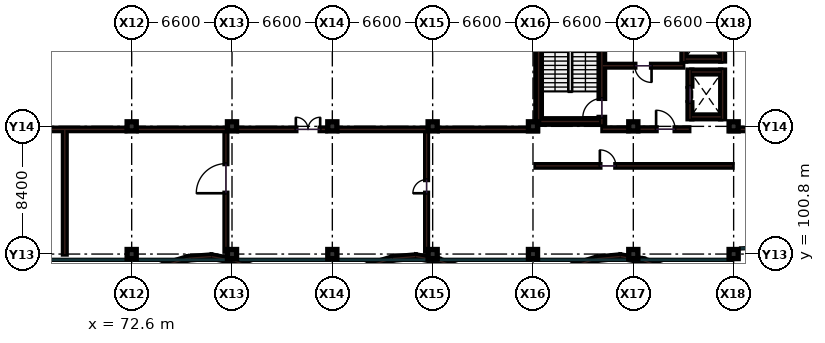
"""IFC4 building model, lengths in metres.
Left out: names, types, materials, properties, quantities, classifications, styles, units other than length and angle.
Written with IfcOpenShell. Run it as: python <this file> out.ifc"""

import sys

from ifc_helpers import new_model, si_unit, direction, frame, frame_2d, origin, origin_2d, place, context, subcontext, project, spatial, rectangle, extrude, element, fill, save


model = new_model("IFC4")
c1 = context("Model", 3, precision=1e-05, world=origin(), true_north=direction((0.0, 1.0)))
c2 = subcontext(c1, "Body", "Model", "MODEL_VIEW")
j1 = project(units=[si_unit("LENGTHUNIT", "METRE"), si_unit("PLANEANGLEUNIT", "RADIAN")], contexts=[c1])
p1 = place(None, origin())
s1 = spatial("IfcSite", under=j1, at=p1, CompositionType="ELEMENT")
p2 = place(p1, origin())
s2 = spatial("IfcBuilding", under=s1, at=p2, CompositionType="ELEMENT")
p3 = place(p2, frame((0.0, 0.0, 14.4)))
s3 = spatial("IfcBuildingStorey", under=s2, at=p3, CompositionType="ELEMENT", Elevation=14.4)
for number, where, z_axis, x_axis in (
    (1, (72.6, 100.8, 0.0), (0.0, 0.0, 1.0), (1.0, 0.0, 0.0)),
    (2, (72.6, 109.2, 0.0), (0.0, 0.0, 1.0), (1.0, 0.0, 0.0)),
    (3, (79.2, 100.8, 0.0), (0.0, 0.0, 1.0), (1.0, 0.0, 0.0)),
    (4, (79.2, 109.2, 0.0), (0.0, 0.0, 1.0), (1.0, 0.0, 0.0)),
    (5, (85.8, 100.8, 0.0), (0.0, 0.0, 1.0), (1.0, 0.0, 0.0)),
    (6, (85.8, 109.2, 0.0), (0.0, 0.0, 1.0), (1.0, 0.0, 0.0)),
    (7, (92.4, 100.8, 0.0), (0.0, 0.0, 1.0), (1.0, 0.0, 0.0)),
    (8, (92.4, 109.2, 0.0), (0.0, 0.0, 1.0), (1.0, 0.0, 0.0)),
    (9, (99.0, 100.8, 0.0), (0.0, 0.0, 1.0), (1.0, 0.0, 0.0)),
    (10, (99.0, 109.2, 0.0), (0.0, 0.0, 1.0), (1.0, 0.0, 0.0)),
    (11, (105.6, 100.8, 0.0), (0.0, 0.0, 1.0), (1.0, 0.0, 0.0)),
    (12, (105.6, 109.2, 0.0), (0.0, 0.0, 1.0), (1.0, 0.0, 0.0)),
    (13, (112.2, 100.8, 0.0), (0.0, 0.0, 1.0), (1.0, 0.0, 0.0)),
    (14, (112.2, 109.2, 0.0), (0.0, 0.0, 1.0), (1.0, 0.0, 0.0)),
):
    element("IfcColumn", number, at=place(p3, frame(where, z_axis=z_axis, x_axis=x_axis)), inside=s3, PredefinedType="COLUMN", context=c2, shape_type="SweptSolid", body=[
        extrude(rectangle(XDim=0.6, YDim=0.6, at=origin_2d()), origin(), (0.0, 0.0, 1.0), 4.2),
    ])
for number, where, z_axis, x_axis in (
    (15, (66.45, 109.0, 0.0), (0.0, 0.0, 1.0), (1.0, 0.0, 0.0)),
    (16, (73.05, 109.0, 0.0), (0.0, 0.0, 1.0), (1.0, 0.0, 0.0)),
):
    element("IfcWall", number, at=place(p3, frame(where, z_axis=z_axis, x_axis=x_axis)), inside=s3, PredefinedType="PARTITIONING", context=c2, shape_type="SweptSolid", body=[
        extrude(rectangle(XDim=5.7, YDim=0.16, at=frame_2d((2.85, 0.0))), origin(), (0.0, 0.0, 1.0), 3.175),
    ])
p4 = place(p3, frame((79.65, 109.0, 0.0), z_axis=(0.0, 0.0, 1.0), x_axis=(1.0, 0.0, 0.0)))
e17 = element("IfcWall", 17, at=p4, inside=s3, PredefinedType="PARTITIONING", context=c2, shape_type="SweptSolid", body=[
    extrude(rectangle(XDim=5.7, YDim=0.16, at=frame_2d((2.85, 0.0))), origin(), (0.0, 0.0, 1.0), 3.175),
])
p5 = place(p4, frame((3.75, 0.0, 0.0)))
e18 = element("IfcOpeningElement", 18, at=p5, cuts=e17, PredefinedType="OPENING", context=c2, shape_type="SweptSolid", body=[
    extrude(rectangle(XDim=1.6, YDim=2.2, at=frame_2d((0.8, 1.1))), frame((0.0, 0.09, 0.0), z_axis=(0.0, -1.0, 0.0), x_axis=(1.0, 0.0, 0.0)), (0.0, 0.0, 1.0), 0.18),
])
p6 = place(p3, frame((86.25, 109.0, 0.0), z_axis=(0.0, 0.0, 1.0), x_axis=(1.0, 0.0, 0.0)))
e19 = element("IfcWall", 19, at=p6, inside=s3, PredefinedType="PARTITIONING", context=c2, shape_type="SweptSolid", body=[
    extrude(rectangle(XDim=5.7, YDim=0.16, at=frame_2d((2.85, 0.0))), origin(), (0.0, 0.0, 1.0), 3.175),
])
p7 = place(p3, frame((92.85, 109.0, 0.0), z_axis=(0.0, 0.0, 1.0), x_axis=(1.0, 0.0, 0.0)))
e20 = element("IfcWall", 20, at=p7, inside=s3, PredefinedType="PARTITIONING", context=c2, shape_type="SweptSolid", body=[
    extrude(rectangle(XDim=6.45, YDim=0.16, at=frame_2d((3.225, 0.0))), origin(), (0.0, 0.0, 1.0), 3.175),
])
p8 = place(p3, frame((112.0, 109.0, 0.0), z_axis=(0.0, 0.0, 1.0), x_axis=(1.0, 0.0, 0.0)))
e21 = element("IfcWall", 21, at=p8, inside=s3, PredefinedType="PARTITIONING", context=c2, shape_type="SweptSolid", body=[
    extrude(rectangle(XDim=6.35, YDim=0.16, at=frame_2d((3.175, 0.0))), origin(), (0.0, 0.0, 1.0), 3.175),
])
p9 = place(p8, frame((4.55, 0.0, 0.0)))
e22 = element("IfcOpeningElement", 22, at=p9, cuts=e21, PredefinedType="OPENING", context=c2, shape_type="SweptSolid", body=[
    extrude(rectangle(XDim=1.45, YDim=2.25, at=frame_2d((0.725, 1.125))), frame((0.0, 0.09, 0.0), z_axis=(0.0, -1.0, 0.0), x_axis=(1.0, 0.0, 0.0)), (0.0, 0.0, 1.0), 0.18),
])
p10 = place(p3, frame((68.2, 100.8, 0.0), z_axis=(0.0, 0.0, 1.0), x_axis=(0.0, 1.0, 0.0)))
e23 = element("IfcWall", 23, at=p10, inside=s3, PredefinedType="SOLIDWALL", context=c2, shape_type="SweptSolid", body=[
    extrude(rectangle(XDim=8.2, YDim=0.18, at=frame_2d((4.1, 0.0))), origin(), (0.0, 0.0, 1.0), 3.19),
])
p11 = place(p3, frame((78.8, 101.0, 0.0), z_axis=(0.0, 0.0, 1.0), x_axis=(0.0, 1.0, 0.0)))
e24 = element("IfcWall", 24, at=p11, inside=s3, PredefinedType="PARTITIONING", context=c2, shape_type="SweptSolid", body=[
    extrude(rectangle(XDim=8.0, YDim=0.12, at=frame_2d((4.0, 0.0))), origin(), (0.0, 0.0, 1.0), 3.19),
])
p12 = place(p11, frame((3.8, 0.0, 0.0)))
e25 = element("IfcOpeningElement", 25, at=p12, cuts=e24, PredefinedType="OPENING", context=c2, shape_type="SweptSolid", body=[
    extrude(rectangle(XDim=1.95, YDim=2.35, at=frame_2d((0.975, 1.175))), frame((0.0, 0.07, 0.0), z_axis=(0.0, -1.0, 0.0), x_axis=(1.0, 0.0, 0.0)), (0.0, 0.0, 1.0), 0.14),
])
p13 = place(p3, frame((92.0, 101.0, 0.0), z_axis=(0.0, 0.0, 1.0), x_axis=(0.0, 1.0, 0.0)))
e26 = element("IfcWall", 26, at=p13, inside=s3, PredefinedType="PARTITIONING", context=c2, shape_type="SweptSolid", body=[
    extrude(rectangle(XDim=8.0, YDim=0.12, at=frame_2d((4.0, 0.0))), origin(), (0.0, 0.0, 1.0), 3.19),
])
p14 = place(p13, frame((3.8, 0.0, 0.0)))
e27 = element("IfcOpeningElement", 27, at=p14, cuts=e26, PredefinedType="OPENING", context=c2, shape_type="SweptSolid", body=[
    extrude(rectangle(XDim=0.9, YDim=2.1, at=frame_2d((0.45, 1.05))), frame((0.0, 0.07, 0.0), z_axis=(0.0, -1.0, 0.0), x_axis=(1.0, 0.0, 0.0)), (0.0, 0.0, 1.0), 0.14),
])
p15 = place(p3, frame((99.2, 106.6, 0.0), z_axis=(0.0, 0.0, 1.0), x_axis=(1.0, 0.0, 0.0)))
e28 = element("IfcWall", 28, at=p15, inside=s3, PredefinedType="PARTITIONING", context=c2, shape_type="SweptSolid", body=[
    extrude(rectangle(XDim=12.9, YDim=0.16, at=frame_2d((6.45, 0.0))), origin(), (0.0, 0.0, 1.0), 3.19),
])
p16 = place(p15, frame((4.2, 0.0, 0.0)))
e29 = element("IfcOpeningElement", 29, at=p16, cuts=e28, PredefinedType="OPENING", context=c2, shape_type="SweptSolid", body=[
    extrude(rectangle(XDim=1.05, YDim=2.15, at=frame_2d((0.525, 1.075))), frame((0.0, 0.09, 0.0), z_axis=(0.0, -1.0, 0.0), x_axis=(1.0, 0.0, 0.0)), (0.0, 0.0, 1.0), 0.18),
])
p17 = place(p3, frame((65.925, 100.325, 0.0), z_axis=(0.0, 0.0, 1.0), x_axis=(0.940508911561, -0.339769020476, 0.0)))
e30 = element("IfcWall", 30, at=p17, inside=s3, PredefinedType="SOLIDWALL", context=c2, shape_type="SweptSolid", body=[
    extrude(rectangle(XDim=1.589, YDim=0.22, at=frame_2d((0.795, 0.0))), origin(), (0.0, 0.0, 1.0), 1.45),
])
p18 = place(p3, frame((74.8, 100.065, 0.0), z_axis=(0.0, 0.0, 1.0), x_axis=(0.957563325811, 0.288222964147, 0.0)))
e31 = element("IfcWall", 31, at=p18, inside=s3, PredefinedType="SOLIDWALL", context=c2, shape_type="SweptSolid", body=[
    extrude(rectangle(XDim=1.561, YDim=0.22, at=frame_2d((0.781, 0.0))), origin(), (0.0, 0.0, 1.0), 1.45),
])
p19 = place(p3, frame((76.325, 100.52, 0.0), z_axis=(0.0, 0.0, 1.0), x_axis=(0.997311127119, 0.073283802613, 0.0)))
e32 = element("IfcWall", 32, at=p19, inside=s3, PredefinedType="SOLIDWALL", context=c2, shape_type="SweptSolid", body=[
    extrude(rectangle(XDim=1.499, YDim=0.22, at=frame_2d((0.75, 0.0))), origin(), (0.0, 0.0, 1.0), 1.45),
])
p20 = place(p3, frame((77.855, 100.63, 0.0), z_axis=(0.0, 0.0, 1.0), x_axis=(0.982937538703, -0.18393965045, 0.0)))
e33 = element("IfcWall", 33, at=p20, inside=s3, PredefinedType="SOLIDWALL", context=c2, shape_type="SweptSolid", body=[
    extrude(rectangle(XDim=1.521, YDim=0.22, at=frame_2d((0.76, 0.0))), origin(), (0.0, 0.0, 1.0), 1.45),
])
p21 = place(p3, frame((79.37, 100.34, 0.0), z_axis=(0.0, 0.0, 1.0), x_axis=(0.941487691535, -0.337047365645, 0.0)))
e34 = element("IfcWall", 34, at=p21, inside=s3, PredefinedType="SOLIDWALL", context=c2, shape_type="SweptSolid", body=[
    extrude(rectangle(XDim=1.588, YDim=0.22, at=frame_2d((0.794, 0.0))), origin(), (0.0, 0.0, 1.0), 1.45),
])
p22 = place(p3, frame((88.25, 100.045, 0.0), z_axis=(0.0, 0.0, 1.0), x_axis=(0.956666312552, 0.291186480503, 0.0)))
e35 = element("IfcWall", 35, at=p22, inside=s3, PredefinedType="SOLIDWALL", context=c2, shape_type="SweptSolid", body=[
    extrude(rectangle(XDim=1.563, YDim=0.22, at=frame_2d((0.781, 0.0))), origin(), (0.0, 0.0, 1.0), 1.45),
])
p23 = place(p3, frame((89.775, 100.505, 0.0), z_axis=(0.0, 0.0, 1.0), x_axis=(0.996233870581, 0.086706834262, 0.0)))
e36 = element("IfcWall", 36, at=p23, inside=s3, PredefinedType="SOLIDWALL", context=c2, shape_type="SweptSolid", body=[
    extrude(rectangle(XDim=1.501, YDim=0.22, at=frame_2d((0.75, 0.0))), origin(), (0.0, 0.0, 1.0), 1.45),
])
p24 = place(p3, frame((91.305, 100.635, 0.0), z_axis=(0.0, 0.0, 1.0), x_axis=(0.984080055178, -0.177725757842, 0.0)))
e37 = element("IfcWall", 37, at=p24, inside=s3, PredefinedType="SOLIDWALL", context=c2, shape_type="SweptSolid", body=[
    extrude(rectangle(XDim=1.519, YDim=0.22, at=frame_2d((0.76, 0.0))), origin(), (0.0, 0.0, 1.0), 1.45),
])
p25 = place(p3, frame((92.82, 100.355, 0.0), z_axis=(0.0, 0.0, 1.0), x_axis=(0.942509092402, -0.334180506223, 0.0)))
e38 = element("IfcWall", 38, at=p25, inside=s3, PredefinedType="SOLIDWALL", context=c2, shape_type="SweptSolid", body=[
    extrude(rectangle(XDim=1.586, YDim=0.22, at=frame_2d((0.793, 0.0))), origin(), (0.0, 0.0, 1.0), 1.45),
])
p26 = place(p3, frame((101.7, 100.025, 0.0), z_axis=(0.0, 0.0, 1.0), x_axis=(0.954867587054, 0.297031801655, 0.0)))
e39 = element("IfcWall", 39, at=p26, inside=s3, PredefinedType="SOLIDWALL", context=c2, shape_type="SweptSolid", body=[
    extrude(rectangle(XDim=1.566, YDim=0.22, at=frame_2d((0.783, 0.0))), origin(), (0.0, 0.0, 1.0), 1.45),
])
p27 = place(p3, frame((103.22, 100.495, 0.0), z_axis=(0.0, 0.0, 1.0), x_axis=(0.995651207458, 0.093159396126, 0.0)))
e40 = element("IfcWall", 40, at=p27, inside=s3, PredefinedType="SOLIDWALL", context=c2, shape_type="SweptSolid", body=[
    extrude(rectangle(XDim=1.502, YDim=0.22, at=frame_2d((0.751, 0.0))), origin(), (0.0, 0.0, 1.0), 1.45),
])
p28 = place(p3, frame((104.755, 100.635, 0.0), z_axis=(0.0, 0.0, 1.0), x_axis=(0.985751401612, -0.168208722189, 0.0)))
e41 = element("IfcWall", 41, at=p28, inside=s3, PredefinedType="SOLIDWALL", context=c2, shape_type="SweptSolid", body=[
    extrude(rectangle(XDim=1.517, YDim=0.22, at=frame_2d((0.758, 0.0))), origin(), (0.0, 0.0, 1.0), 1.45),
])
p29 = place(p3, frame((106.27, 100.37, 0.0), z_axis=(0.0, 0.0, 1.0), x_axis=(0.943135745447, -0.332407830322, 0.0)))
e42 = element("IfcWall", 42, at=p29, inside=s3, PredefinedType="SOLIDWALL", context=c2, shape_type="SweptSolid", body=[
    extrude(rectangle(XDim=1.58, YDim=0.22, at=frame_2d((0.79, 0.0))), origin(), (0.0, 0.0, 1.0), 1.45),
])
p30 = place(p3, frame((99.37, 109.34, 0.0), z_axis=(0.0, 0.0, 1.0), x_axis=(0.0, 1.0, 0.0)))
e43 = element("IfcWall", 43, at=p30, inside=s3, PredefinedType="SHEAR", context=c2, shape_type="SweptSolid", body=[
    extrude(rectangle(XDim=8.09, YDim=0.36, at=frame_2d((4.045, 0.0))), origin(), (0.0, 0.0, 1.0), 3.94),
])
p31 = place(p3, frame((103.53, 109.34, 0.0), z_axis=(0.0, 0.0, 1.0), x_axis=(0.0, 1.0, 0.0)))
e44 = element("IfcWall", 44, at=p31, inside=s3, PredefinedType="SHEAR", context=c2, shape_type="SweptSolid", body=[
    extrude(rectangle(XDim=8.09, YDim=0.36, at=frame_2d((4.045, 0.0))), origin(), (0.0, 0.0, 1.0), 3.94),
])
p32 = place(p31, frame((0.45, 0.0, 0.0)))
e45 = element("IfcOpeningElement", 45, at=p32, cuts=e44, PredefinedType="OPENING", context=c2, shape_type="SweptSolid", body=[
    extrude(rectangle(XDim=1.25, YDim=2.15, at=frame_2d((0.625, 1.075))), frame((0.0, 0.19, 0.0), z_axis=(0.0, -1.0, 0.0), x_axis=(1.0, 0.0, 0.0)), (0.0, 0.0, 1.0), 0.38),
])
p33 = place(p3, frame((99.55, 109.52, 0.0), z_axis=(0.0, 0.0, 1.0), x_axis=(1.0, 0.0, 0.0)))
e46 = element("IfcWall", 46, at=p33, inside=s3, PredefinedType="SHEAR", context=c2, shape_type="SweptSolid", body=[
    extrude(rectangle(XDim=3.8, YDim=0.36, at=frame_2d((1.9, 0.0))), origin(), (0.0, 0.0, 1.0), 3.94),
])
p34 = place(p3, frame((109.325, 109.7, 0.0), z_axis=(0.0, 0.0, 1.0), x_axis=(0.0, 1.0, 0.0)))
e47 = element("IfcWall", 47, at=p34, inside=s3, PredefinedType="SHEAR", context=c2, shape_type="SweptSolid", body=[
    extrude(rectangle(XDim=3.2, YDim=0.25, at=frame_2d((1.6, 0.0))), origin(), (0.0, 0.0, 1.0), 3.94),
])
p35 = place(p34, frame((1.05, 0.0, 0.0)))
e48 = element("IfcOpeningElement", 48, at=p35, cuts=e47, PredefinedType="OPENING", context=c2, shape_type="SweptSolid", body=[
    extrude(rectangle(XDim=1.1, YDim=2.15, at=frame_2d((0.55, 1.075))), frame((0.0, 0.135, 0.0), z_axis=(0.0, -1.0, 0.0), x_axis=(1.0, 0.0, 0.0)), (0.0, 0.0, 1.0), 0.27),
])
p36 = place(p3, frame((111.475, 109.7, 0.0), z_axis=(0.0, 0.0, 1.0), x_axis=(0.0, 1.0, 0.0)))
e49 = element("IfcWall", 49, at=p36, inside=s3, PredefinedType="SHEAR", context=c2, shape_type="SweptSolid", body=[
    extrude(rectangle(XDim=3.2, YDim=0.25, at=frame_2d((1.6, 0.0))), origin(), (0.0, 0.0, 1.0), 3.94),
])
for number, where, z_axis, x_axis in (
    (50, (109.45, 109.825, 0.0), (0.0, 0.0, 1.0), (1.0, 0.0, 0.0)),
    (51, (109.45, 112.775, 0.0), (0.0, 0.0, 1.0), (1.0, 0.0, 0.0)),
):
    element("IfcWall", number, at=place(p3, frame(where, z_axis=z_axis, x_axis=x_axis)), inside=s3, PredefinedType="SHEAR", context=c2, shape_type="SweptSolid", body=[
        extrude(rectangle(XDim=1.9, YDim=0.25, at=frame_2d((0.95, 0.0))), origin(), (0.0, 0.0, 1.0), 3.94),
    ])
p37 = place(p3, frame((108.925, 113.5, 0.0), z_axis=(0.0, 0.0, 1.0), x_axis=(0.0, 1.0, 0.0)))
e52 = element("IfcWall", 52, at=p37, inside=s3, PredefinedType="SHEAR", context=c2, shape_type="SweptSolid", body=[
    extrude(rectangle(XDim=3.6, YDim=0.25, at=frame_2d((1.8, 0.0))), origin(), (0.0, 0.0, 1.0), 3.94),
])
p38 = place(p37, frame((1.1, 0.0, 0.0)))
e53 = element("IfcOpeningElement", 53, at=p38, cuts=e52, PredefinedType="OPENING", context=c2, shape_type="SweptSolid", body=[
    extrude(rectangle(XDim=1.4, YDim=2.2, at=frame_2d((0.7, 1.1))), frame((0.0, 0.135, 0.0), z_axis=(0.0, -1.0, 0.0), x_axis=(1.0, 0.0, 0.0)), (0.0, 0.0, 1.0), 0.27),
])
p39 = place(p3, frame((111.475, 113.5, 0.0), z_axis=(0.0, 0.0, 1.0), x_axis=(0.0, 1.0, 0.0)))
e54 = element("IfcWall", 54, at=p39, inside=s3, PredefinedType="SHEAR", context=c2, shape_type="SweptSolid", body=[
    extrude(rectangle(XDim=3.6, YDim=0.25, at=frame_2d((1.8, 0.0))), origin(), (0.0, 0.0, 1.0), 3.94),
])
p40 = place(p3, frame((109.05, 113.625, 0.0), z_axis=(0.0, 0.0, 1.0), x_axis=(1.0, 0.0, 0.0)))
e55 = element("IfcWall", 55, at=p40, inside=s3, PredefinedType="SHEAR", context=c2, shape_type="SweptSolid", body=[
    extrude(rectangle(XDim=2.3, YDim=0.25, at=frame_2d((1.15, 0.0))), origin(), (0.0, 0.0, 1.0), 3.94),
])
p41 = place(p3, frame((103.6, 109.01, 0.0), z_axis=(0.0, 0.0, 1.0), x_axis=(1.0, 0.0, 0.0)))
e56 = element("IfcWall", 56, at=p41, inside=s3, PredefinedType="SOLIDWALL", context=c2, shape_type="SweptSolid", body=[
    extrude(rectangle(XDim=1.65, YDim=0.18, at=frame_2d((0.825, 0.0))), origin(), (0.0, 0.0, 1.0), 3.175),
])
p42 = place(p3, frame((105.95, 109.01, 0.0), z_axis=(0.0, 0.0, 1.0), x_axis=(1.0, 0.0, 0.0)))
e57 = element("IfcWall", 57, at=p42, inside=s3, PredefinedType="SOLIDWALL", context=c2, shape_type="SweptSolid", body=[
    extrude(rectangle(XDim=3.3, YDim=0.18, at=frame_2d((1.65, 0.0))), origin(), (0.0, 0.0, 1.0), 3.175),
])
p43 = place(p42, frame((1.15, 0.0, 0.0)))
e58 = element("IfcOpeningElement", 58, at=p43, cuts=e57, PredefinedType="OPENING", context=c2, shape_type="SweptSolid", body=[
    extrude(rectangle(XDim=1.25, YDim=2.15, at=frame_2d((0.625, 1.075))), frame((0.0, 0.1, 0.0), z_axis=(0.0, -1.0, 0.0), x_axis=(1.0, 0.0, 0.0)), (0.0, 0.0, 1.0), 0.2),
])
p44 = place(p3, frame((103.6, 113.19, 0.0), z_axis=(0.0, 0.0, 1.0), x_axis=(1.0, 0.0, 0.0)))
e59 = element("IfcWall", 59, at=p44, inside=s3, PredefinedType="SOLIDWALL", context=c2, shape_type="SweptSolid", body=[
    extrude(rectangle(XDim=5.25, YDim=0.18, at=frame_2d((2.625, 0.0))), origin(), (0.0, 0.0, 1.0), 3.94),
])
p45 = place(p44, frame((2.1, 0.0, 0.0)))
e60 = element("IfcOpeningElement", 60, at=p45, cuts=e59, PredefinedType="OPENING", context=c2, shape_type="SweptSolid", body=[
    extrude(rectangle(XDim=1.1, YDim=2.15, at=frame_2d((0.55, 1.075))), frame((0.0, 0.1, 0.0), z_axis=(0.0, -1.0, 0.0), x_axis=(1.0, 0.0, 0.0)), (0.0, 0.0, 1.0), 0.2),
])
p46 = place(p5, origin())
e61 = element("IfcDoor", 61, at=p46, inside=s3, OperationType="DOUBLE_DOOR_SINGLE_SWING", PredefinedType="DOOR", context=c2, shape_type="SweptSolid", body=[
    extrude(rectangle(XDim=1.6, YDim=2.2, at=frame_2d((0.8, 1.1))), frame((0.0, 0.025, 0.0), z_axis=(0.0, -1.0, 0.0), x_axis=(1.0, 0.0, 0.0)), (0.0, 0.0, 1.0), 0.05),
])
fill(e18, e61)
p47 = place(p12, origin())
e62 = element("IfcDoor", 62, at=p47, inside=s3, OperationType="SINGLE_SWING_LEFT", PredefinedType="DOOR", context=c2, shape_type="SweptSolid", body=[
    extrude(rectangle(XDim=1.95, YDim=2.35, at=frame_2d((0.975, 1.175))), frame((0.0, 0.025, 0.0), z_axis=(0.0, -1.0, 0.0), x_axis=(1.0, 0.0, 0.0)), (0.0, 0.0, 1.0), 0.05),
])
fill(e25, e62)
p48 = place(p14, origin())
e63 = element("IfcDoor", 63, at=p48, inside=s3, OperationType="SINGLE_SWING_LEFT", PredefinedType="DOOR", context=c2, shape_type="SweptSolid", body=[
    extrude(rectangle(XDim=0.9, YDim=2.1, at=frame_2d((0.45, 1.05))), frame((0.0, 0.025, 0.0), z_axis=(0.0, -1.0, 0.0), x_axis=(1.0, 0.0, 0.0)), (0.0, 0.0, 1.0), 0.05),
])
fill(e27, e63)
p49 = place(p16, origin())
e64 = element("IfcDoor", 64, at=p49, inside=s3, OperationType="SINGLE_SWING_LEFT", PredefinedType="DOOR", context=c2, shape_type="SweptSolid", body=[
    extrude(rectangle(XDim=1.05, YDim=2.15, at=frame_2d((0.525, 1.075))), frame((0.0, 0.025, 0.0), z_axis=(0.0, -1.0, 0.0), x_axis=(1.0, 0.0, 0.0)), (0.0, 0.0, 1.0), 0.05),
])
fill(e29, e64)
p50 = place(p32, origin())
e65 = element("IfcDoor", 65, at=p50, inside=s3, OperationType="SINGLE_SWING_LEFT", PredefinedType="DOOR", context=c2, shape_type="SweptSolid", body=[
    extrude(rectangle(XDim=1.25, YDim=2.15, at=frame_2d((0.625, 1.075))), frame((0.0, 0.025, 0.0), z_axis=(0.0, -1.0, 0.0), x_axis=(1.0, 0.0, 0.0)), (0.0, 0.0, 1.0), 0.05),
])
fill(e45, e65)
p51 = place(p35, origin())
e66 = element("IfcDoor", 66, at=p51, inside=s3, OperationType="SLIDING_TO_LEFT", PredefinedType="DOOR", context=c2, shape_type="SweptSolid", body=[
    extrude(rectangle(XDim=1.1, YDim=2.15, at=frame_2d((0.55, 1.075))), frame((0.0, 0.025, 0.0), z_axis=(0.0, -1.0, 0.0), x_axis=(1.0, 0.0, 0.0)), (0.0, 0.0, 1.0), 0.05),
])
fill(e48, e66)
p52 = place(p43, origin())
e67 = element("IfcDoor", 67, at=p52, inside=s3, OperationType="SINGLE_SWING_LEFT", PredefinedType="DOOR", context=c2, shape_type="SweptSolid", body=[
    extrude(rectangle(XDim=1.25, YDim=2.15, at=frame_2d((0.625, 1.075))), frame((0.0, 0.025, 0.0), z_axis=(0.0, -1.0, 0.0), x_axis=(1.0, 0.0, 0.0)), (0.0, 0.0, 1.0), 0.05),
])
fill(e58, e67)
p53 = place(p45, frame((1.1, 0.0, 0.0), z_axis=(0.0, 0.0, 1.0), x_axis=(-1.0, 0.0, 0.0)))
e68 = element("IfcDoor", 68, at=p53, inside=s3, OperationType="SINGLE_SWING_RIGHT", PredefinedType="DOOR", context=c2, shape_type="SweptSolid", body=[
    extrude(rectangle(XDim=1.1, YDim=2.15, at=frame_2d((0.55, 1.075))), frame((0.0, 0.025, 0.0), z_axis=(0.0, -1.0, 0.0), x_axis=(1.0, 0.0, 0.0)), (0.0, 0.0, 1.0), 0.05),
])
fill(e60, e68)
save(model, sys.argv[1])
